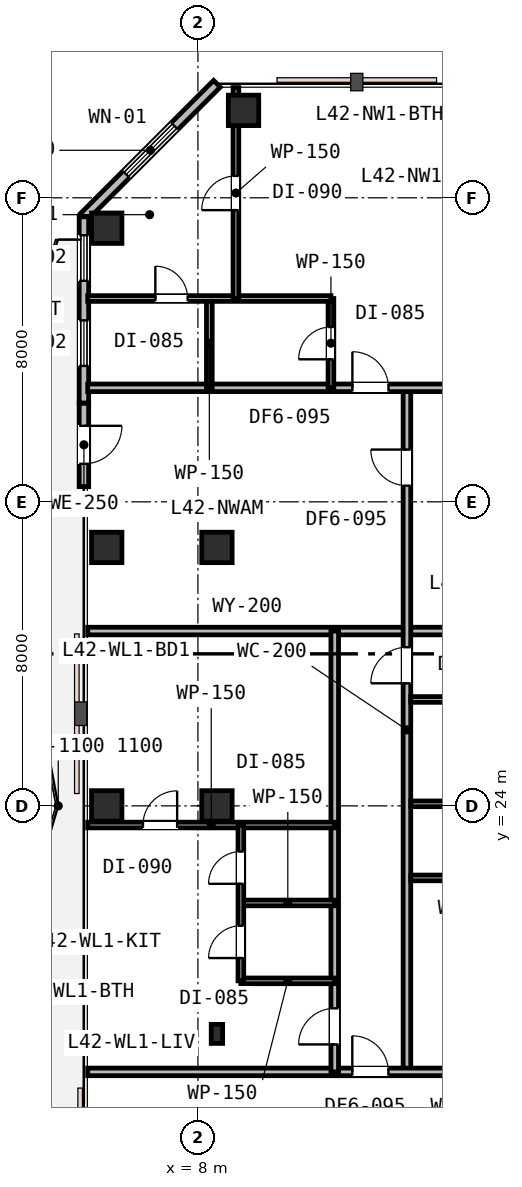
"""IFC4 building model, lengths in metres.
Left out: names, types, materials, properties, quantities, classifications, styles, units other than length and angle.
Written with IfcOpenShell. Run it as: python <this file> out.ifc"""

import sys

from ifc_helpers import new_model, si_unit, direction, frame, frame_2d, origin, origin_2d, place, context, subcontext, project, spatial, rectangle, i_section, extrude, element, fill, save


model = new_model("IFC4")
c1 = context("Model", 3, precision=1e-05, world=origin(), true_north=direction((0.0, 1.0)))
c2 = subcontext(c1, "Body", "Model", "MODEL_VIEW")
j1 = project(units=[si_unit("LENGTHUNIT", "METRE"), si_unit("PLANEANGLEUNIT", "RADIAN")], contexts=[c1])
p1 = place(None, origin())
s1 = spatial("IfcSite", under=j1, at=p1, CompositionType="ELEMENT")
p2 = place(p1, origin())
s2 = spatial("IfcBuilding", under=s1, at=p2, CompositionType="ELEMENT")
p3 = place(p2, frame((0.0, 0.0, 165.0)))
s3 = spatial("IfcBuildingStorey", under=s2, at=p3, CompositionType="ELEMENT", Elevation=165.0)
for number, where, z_axis, x_axis in (
    (1, (8.5, 24.0, 0.0), (0.0, 0.0, 1.0), (1.0, 0.0, 0.0)),
    (2, (5.6, 24.0, 0.0), (0.0, 0.0, 1.0), (1.0, 0.0, 0.0)),
    (3, (5.6, 30.8, 0.0), (0.0, 0.0, 1.0), (1.0, 0.0, 0.0)),
    (4, (5.6, 39.2, 0.0), (0.0, 0.0, 1.0), (1.0, 0.0, 0.0)),
    (5, (8.5, 30.8, 0.0), (0.0, 0.0, 1.0), (1.0, 0.0, 0.0)),
    (6, (9.2, 42.3, 0.0), (0.0, 0.0, 1.0), (1.0, 0.0, 0.0)),
):
    element("IfcColumn", number, at=place(p3, frame(where, z_axis=z_axis, x_axis=x_axis)), inside=s3, PredefinedType="COLUMN", context=c2, shape_type="SweptSolid", body=[
        extrude(rectangle(XDim=0.8, YDim=0.8, at=origin_2d()), origin(), (0.0, 0.0, 1.0), 3.6),
    ])
p4 = place(p3, frame((8.5, 18.0, 0.0), z_axis=(0.0, 0.0, 1.0), x_axis=(1.0, 0.0, 0.0)))
e7 = element("IfcColumn", 7, at=p4, inside=s3, PredefinedType="COLUMN", context=c2, shape_type="SweptSolid", body=[
    extrude(i_section(OverallWidth=0.3, OverallDepth=0.5, WebThickness=0.015, FlangeThickness=0.028, FilletRadius=0.027, at=origin_2d()), origin(), (0.0, 0.0, 1.0), 3.6),
])
p5 = place(p3, frame((8.5, 43.0, 0.0), z_axis=(0.0, 0.0, 1.0), x_axis=(-0.707106781187, -0.707106781187, 0.0)))
e8 = element("IfcWall", 8, at=p5, inside=s3, PredefinedType="STANDARD", context=c2, shape_type="SweptSolid", body=[
    extrude(rectangle(XDim=4.95, YDim=0.25, at=frame_2d((2.475, 0.0))), origin(), (0.0, 0.0, 1.0), 3.33),
])
p6 = place(p5, frame((1.575, 0.0, 0.75)))
e9 = element("IfcOpeningElement", 9, at=p6, cuts=e8, PredefinedType="OPENING", context=c2, shape_type="SweptSolid", body=[
    extrude(rectangle(XDim=1.8, YDim=1.85, at=frame_2d((0.9, 0.925))), frame((0.0, 0.135, 0.0), z_axis=(0.0, -1.0, 0.0), x_axis=(1.0, 0.0, 0.0)), (0.0, 0.0, 1.0), 0.27),
])
p7 = place(p3, frame((5.0, 34.6, 0.0), z_axis=(0.0, 0.0, 1.0), x_axis=(0.0, -1.0, 0.0)))
e10 = element("IfcWall", 10, at=p7, inside=s3, PredefinedType="STANDARD", context=c2, shape_type="SweptSolid", body=[
    extrude(rectangle(XDim=2.2, YDim=0.25, at=frame_2d((1.1, 0.0))), origin(), (0.0, 0.0, 1.0), 3.33),
])
p8 = place(p7, frame((0.6, 0.0, 0.0)))
e11 = element("IfcOpeningElement", 11, at=p8, cuts=e10, PredefinedType="OPENING", context=c2, shape_type="SweptSolid", body=[
    extrude(rectangle(XDim=1.0, YDim=2.15, at=frame_2d((0.5, 1.075))), frame((0.0, 0.135, 0.0), z_axis=(0.0, -1.0, 0.0), x_axis=(1.0, 0.0, 0.0)), (0.0, 0.0, 1.0), 0.27),
])
p9 = place(p3, frame((5.0, 39.5, 0.0), z_axis=(0.0, 0.0, 1.0), x_axis=(0.0, -1.0, 0.0)))
e12 = element("IfcWall", 12, at=p9, inside=s3, PredefinedType="STANDARD", context=c2, shape_type="SweptSolid", body=[
    extrude(rectangle(XDim=4.9, YDim=0.25, at=frame_2d((2.45, 0.0))), origin(), (0.0, 0.0, 1.0), 3.33),
])
p10 = place(p9, frame((0.485, 0.0, 0.85)))
e13 = element("IfcOpeningElement", 13, at=p10, cuts=e12, PredefinedType="OPENING", context=c2, shape_type="SweptSolid", body=[
    extrude(rectangle(XDim=1.2, YDim=1.6, at=frame_2d((0.6, 0.8))), frame((0.0, 0.135, 0.0), z_axis=(0.0, -1.0, 0.0), x_axis=(1.0, 0.0, 0.0)), (0.0, 0.0, 1.0), 0.27),
])
p11 = place(p9, frame((2.725, 0.0, 0.85)))
e14 = element("IfcOpeningElement", 14, at=p11, cuts=e12, PredefinedType="OPENING", context=c2, shape_type="SweptSolid", body=[
    extrude(rectangle(XDim=1.2, YDim=1.6, at=frame_2d((0.6, 0.8))), frame((0.0, 0.135, 0.0), z_axis=(0.0, -1.0, 0.0), x_axis=(1.0, 0.0, 0.0)), (0.0, 0.0, 1.0), 0.27),
])
p12 = place(p3, frame((5.1, 28.6, 0.0), z_axis=(0.0, 0.0, 1.0), x_axis=(1.0, 0.0, 0.0)))
e15 = element("IfcWall", 15, at=p12, inside=s3, PredefinedType="PARTITIONING", context=c2, shape_type="SweptSolid", body=[
    extrude(rectangle(XDim=8.4, YDim=0.2, at=frame_2d((4.2, 0.0))), origin(), (0.0, 0.0, 1.0), 2.93),
])
p13 = place(p3, frame((13.6, 28.6, 0.0), z_axis=(0.0, 0.0, 1.0), x_axis=(1.0, 0.0, 0.0)))
e16 = element("IfcWall", 16, at=p13, inside=s3, PredefinedType="PARTITIONING", context=c2, shape_type="SweptSolid", body=[
    extrude(rectangle(XDim=37.3, YDim=0.2, at=frame_2d((18.65, 0.0))), origin(), (0.0, 0.0, 1.0), 2.93),
])
p14 = place(p13, frame((16.025, 0.0, 0.0)))
e17 = element("IfcOpeningElement", 17, at=p14, cuts=e16, PredefinedType="OPENING", context=c2, shape_type="SweptSolid", body=[
    extrude(rectangle(XDim=0.95, YDim=2.15, at=frame_2d((0.475, 1.075))), frame((0.0, 0.11, 0.0), z_axis=(0.0, -1.0, 0.0), x_axis=(1.0, 0.0, 0.0)), (0.0, 0.0, 1.0), 0.22),
])
p15 = place(p13, frame((25.925, 0.0, 0.0)))
e18 = element("IfcOpeningElement", 18, at=p15, cuts=e16, PredefinedType="OPENING", context=c2, shape_type="SweptSolid", body=[
    extrude(rectangle(XDim=0.95, YDim=2.15, at=frame_2d((0.475, 1.075))), frame((0.0, 0.11, 0.0), z_axis=(0.0, -1.0, 0.0), x_axis=(1.0, 0.0, 0.0)), (0.0, 0.0, 1.0), 0.22),
])
p16 = place(p3, frame((13.5, 17.0, 0.0), z_axis=(0.0, 0.0, 1.0), x_axis=(0.0, 1.0, 0.0)))
e19 = element("IfcWall", 19, at=p16, inside=s3, PredefinedType="PARTITIONING", context=c2, shape_type="SweptSolid", body=[
    extrude(rectangle(XDim=18.0, YDim=0.2, at=frame_2d((9.0, 0.0))), origin(), (0.0, 0.0, 1.0), 2.93),
])
p17 = place(p16, frame((15.425, 0.0, 0.0)))
e20 = element("IfcOpeningElement", 20, at=p17, cuts=e19, PredefinedType="OPENING", context=c2, shape_type="SweptSolid", body=[
    extrude(rectangle(XDim=0.95, YDim=2.15, at=frame_2d((0.475, 1.075))), frame((0.0, 0.11, 0.0), z_axis=(0.0, -1.0, 0.0), x_axis=(1.0, 0.0, 0.0)), (0.0, 0.0, 1.0), 0.22),
])
p18 = place(p16, frame((10.225, 0.0, 0.0)))
e21 = element("IfcOpeningElement", 21, at=p18, cuts=e19, PredefinedType="OPENING", context=c2, shape_type="SweptSolid", body=[
    extrude(rectangle(XDim=0.95, YDim=2.15, at=frame_2d((0.475, 1.075))), frame((0.0, 0.11, 0.0), z_axis=(0.0, -1.0, 0.0), x_axis=(1.0, 0.0, 0.0)), (0.0, 0.0, 1.0), 0.22),
])
p19 = place(p3, frame((5.1, 35.0, 0.0), z_axis=(0.0, 0.0, 1.0), x_axis=(1.0, 0.0, 0.0)))
e22 = element("IfcWall", 22, at=p19, inside=s3, PredefinedType="PARTITIONING", context=c2, shape_type="SweptSolid", body=[
    extrude(rectangle(XDim=10.8, YDim=0.2, at=frame_2d((5.4, 0.0))), origin(), (0.0, 0.0, 1.0), 3.01),
])
p20 = place(p19, frame((6.964, 0.0, 0.0)))
e23 = element("IfcOpeningElement", 23, at=p20, cuts=e22, PredefinedType="OPENING", context=c2, shape_type="SweptSolid", body=[
    extrude(rectangle(XDim=0.95, YDim=2.15, at=frame_2d((0.475, 1.075))), frame((0.0, 0.11, 0.0), z_axis=(0.0, -1.0, 0.0), x_axis=(1.0, 0.0, 0.0)), (0.0, 0.0, 1.0), 0.22),
])
p21 = place(p3, frame((11.5, 35.0, 0.0), z_axis=(0.0, 0.0, 1.0), x_axis=(0.0, 1.0, 0.0)))
e24 = element("IfcWall", 24, at=p21, inside=s3, PredefinedType="PARTITIONING", context=c2, shape_type="SweptSolid", body=[
    extrude(rectangle(XDim=2.35, YDim=0.15, at=frame_2d((1.175, 0.0))), origin(), (0.0, 0.0, 1.0), 3.33),
])
p22 = place(p21, frame((0.75, 0.0, 0.0)))
e25 = element("IfcOpeningElement", 25, at=p22, cuts=e24, PredefinedType="OPENING", context=c2, shape_type="SweptSolid", body=[
    extrude(rectangle(XDim=0.85, YDim=2.15, at=frame_2d((0.425, 1.075))), frame((0.0, 0.085, 0.0), z_axis=(0.0, -1.0, 0.0), x_axis=(1.0, 0.0, 0.0)), (0.0, 0.0, 1.0), 0.17),
])
p23 = place(p3, frame((8.3, 35.0, 0.0), z_axis=(0.0, 0.0, 1.0), x_axis=(0.0, 1.0, 0.0)))
e26 = element("IfcWall", 26, at=p23, inside=s3, PredefinedType="PARTITIONING", context=c2, shape_type="SweptSolid", body=[
    extrude(rectangle(XDim=2.35, YDim=0.15, at=frame_2d((1.175, 0.0))), origin(), (0.0, 0.0, 1.0), 3.33),
])
p24 = place(p3, frame((5.1, 37.35, 0.0), z_axis=(0.0, 0.0, 1.0), x_axis=(1.0, 0.0, 0.0)))
e27 = element("IfcWall", 27, at=p24, inside=s3, PredefinedType="PARTITIONING", context=c2, shape_type="SweptSolid", body=[
    extrude(rectangle(XDim=6.4, YDim=0.15, at=frame_2d((3.2, 0.0))), origin(), (0.0, 0.0, 1.0), 3.01),
])
p25 = place(p24, frame((1.78, 0.0, 0.0)))
e28 = element("IfcOpeningElement", 28, at=p25, cuts=e27, PredefinedType="OPENING", context=c2, shape_type="SweptSolid", body=[
    extrude(rectangle(XDim=0.85, YDim=2.15, at=frame_2d((0.425, 1.075))), frame((0.0, 0.085, 0.0), z_axis=(0.0, -1.0, 0.0), x_axis=(1.0, 0.0, 0.0)), (0.0, 0.0, 1.0), 0.17),
])
p26 = place(p3, frame((9.0, 37.35, 0.0), z_axis=(0.0, 0.0, 1.0), x_axis=(0.0, 1.0, 0.0)))
e29 = element("IfcWall", 29, at=p26, inside=s3, PredefinedType="PARTITIONING", context=c2, shape_type="SweptSolid", body=[
    extrude(rectangle(XDim=5.55, YDim=0.15, at=frame_2d((2.775, 0.0))), origin(), (0.0, 0.0, 1.0), 3.01),
])
p27 = place(p26, frame((2.325, 0.0, 0.0)))
e30 = element("IfcOpeningElement", 30, at=p27, cuts=e29, PredefinedType="OPENING", context=c2, shape_type="SweptSolid", body=[
    extrude(rectangle(XDim=0.9, YDim=2.15, at=frame_2d((0.45, 1.075))), frame((0.0, 0.085, 0.0), z_axis=(0.0, -1.0, 0.0), x_axis=(1.0, 0.0, 0.0)), (0.0, 0.0, 1.0), 0.17),
])
p28 = place(p3, frame((5.1, 17.0, 0.0), z_axis=(0.0, 0.0, 1.0), x_axis=(1.0, 0.0, 0.0)))
e31 = element("IfcWall", 31, at=p28, inside=s3, PredefinedType="PARTITIONING", context=c2, shape_type="SweptSolid", body=[
    extrude(rectangle(XDim=18.8, YDim=0.2, at=frame_2d((9.4, 0.0))), origin(), (0.0, 0.0, 1.0), 2.93),
])
p29 = place(p28, frame((6.962, 0.0, 0.0)))
e32 = element("IfcOpeningElement", 32, at=p29, cuts=e31, PredefinedType="OPENING", context=c2, shape_type="SweptSolid", body=[
    extrude(rectangle(XDim=0.95, YDim=2.15, at=frame_2d((0.475, 1.075))), frame((0.0, 0.11, 0.0), z_axis=(0.0, -1.0, 0.0), x_axis=(1.0, 0.0, 0.0)), (0.0, 0.0, 1.0), 0.22),
])
p30 = place(p3, frame((11.6, 17.0, 0.0), z_axis=(0.0, 0.0, 1.0), x_axis=(0.0, 1.0, 0.0)))
e33 = element("IfcWall", 33, at=p30, inside=s3, PredefinedType="PARTITIONING", context=c2, shape_type="SweptSolid", body=[
    extrude(rectangle(XDim=11.6, YDim=0.2, at=frame_2d((5.8, 0.0))), origin(), (0.0, 0.0, 1.0), 2.93),
])
p31 = place(p30, frame((0.723, 0.0, 0.0)))
e34 = element("IfcOpeningElement", 34, at=p31, cuts=e33, PredefinedType="OPENING", context=c2, shape_type="SweptSolid", body=[
    extrude(rectangle(XDim=0.95, YDim=2.15, at=frame_2d((0.475, 1.075))), frame((0.0, 0.11, 0.0), z_axis=(0.0, -1.0, 0.0), x_axis=(1.0, 0.0, 0.0)), (0.0, 0.0, 1.0), 0.22),
])
for number, where, z_axis, x_axis in (
    (35, (9.13, 19.396, 0.0), (0.0, 0.0, 1.0), (1.0, 0.0, 0.0)),
    (36, (9.13, 21.446, 0.0), (0.0, 0.0, 1.0), (1.0, 0.0, 0.0)),
):
    element("IfcWall", number, at=place(p3, frame(where, z_axis=z_axis, x_axis=x_axis)), inside=s3, PredefinedType="PARTITIONING", context=c2, shape_type="SweptSolid", body=[
        extrude(rectangle(XDim=2.47, YDim=0.15, at=frame_2d((1.235, 0.0))), origin(), (0.0, 0.0, 1.0), 3.33),
    ])
p32 = place(p3, frame((5.1, 23.496, 0.0), z_axis=(0.0, 0.0, 1.0), x_axis=(1.0, 0.0, 0.0)))
e37 = element("IfcWall", 37, at=p32, inside=s3, PredefinedType="PARTITIONING", context=c2, shape_type="SweptSolid", body=[
    extrude(rectangle(XDim=6.5, YDim=0.15, at=frame_2d((3.25, 0.0))), origin(), (0.0, 0.0, 1.0), 2.93),
])
p33 = place(p32, frame((1.453, 0.0, 0.0)))
e38 = element("IfcOpeningElement", 38, at=p33, cuts=e37, PredefinedType="OPENING", context=c2, shape_type="SweptSolid", body=[
    extrude(rectangle(XDim=0.9, YDim=2.15, at=frame_2d((0.45, 1.075))), frame((0.0, 0.085, 0.0), z_axis=(0.0, -1.0, 0.0), x_axis=(1.0, 0.0, 0.0)), (0.0, 0.0, 1.0), 0.17),
])
p34 = place(p3, frame((9.13, 19.396, 0.0), z_axis=(0.0, 0.0, 1.0), x_axis=(0.0, 1.0, 0.0)))
e39 = element("IfcWall", 39, at=p34, inside=s3, PredefinedType="PARTITIONING", context=c2, shape_type="SweptSolid", body=[
    extrude(rectangle(XDim=4.1, YDim=0.15, at=frame_2d((2.05, 0.0))), origin(), (0.0, 0.0, 1.0), 2.93),
])
p35 = place(p34, frame((0.6, 0.0, 0.0)))
e40 = element("IfcOpeningElement", 40, at=p35, cuts=e39, PredefinedType="OPENING", context=c2, shape_type="SweptSolid", body=[
    extrude(rectangle(XDim=0.85, YDim=2.15, at=frame_2d((0.425, 1.075))), frame((0.0, 0.085, 0.0), z_axis=(0.0, -1.0, 0.0), x_axis=(1.0, 0.0, 0.0)), (0.0, 0.0, 1.0), 0.17),
])
p36 = place(p34, frame((2.553, 0.0, 0.0)))
e41 = element("IfcOpeningElement", 41, at=p36, cuts=e39, PredefinedType="OPENING", context=c2, shape_type="SweptSolid", body=[
    extrude(rectangle(XDim=0.85, YDim=2.15, at=frame_2d((0.425, 1.075))), frame((0.0, 0.085, 0.0), z_axis=(0.0, -1.0, 0.0), x_axis=(1.0, 0.0, 0.0)), (0.0, 0.0, 1.0), 0.17),
])
p37 = place(p3, frame((13.6, 22.104, 0.0), z_axis=(0.0, 0.0, 1.0), x_axis=(1.0, 0.0, 0.0)))
e42 = element("IfcWall", 42, at=p37, inside=s3, PredefinedType="PARTITIONING", context=c2, shape_type="SweptSolid", body=[
    extrude(rectangle(XDim=10.3, YDim=0.15, at=frame_2d((5.15, 0.0))), origin(), (0.0, 0.0, 1.0), 2.93),
])
p38 = place(p37, frame((6.325, 0.0, 0.0)))
e43 = element("IfcOpeningElement", 43, at=p38, cuts=e42, PredefinedType="OPENING", context=c2, shape_type="SweptSolid", body=[
    extrude(rectangle(XDim=0.9, YDim=2.15, at=frame_2d((0.45, 1.075))), frame((0.0, 0.085, 0.0), z_axis=(0.0, -1.0, 0.0), x_axis=(1.0, 0.0, 0.0)), (0.0, 0.0, 1.0), 0.17),
])
for number, where, z_axis, x_axis in (
    (44, (13.6, 24.054, 0.0), (0.0, 0.0, 1.0), (1.0, 0.0, 0.0)),
    (45, (13.6, 26.8, 0.0), (0.0, 0.0, 1.0), (1.0, 0.0, 0.0)),
):
    element("IfcWall", number, at=place(p3, frame(where, z_axis=z_axis, x_axis=x_axis)), inside=s3, PredefinedType="PARTITIONING", context=c2, shape_type="SweptSolid", body=[
        extrude(rectangle(XDim=3.25, YDim=0.15, at=frame_2d((1.625, 0.0))), origin(), (0.0, 0.0, 1.0), 2.93),
    ])
p39 = place(p6, origin())
e46 = element("IfcWindow", 46, at=p39, inside=s3, PartitioningType="SINGLE_PANEL", PredefinedType="WINDOW", context=c2, shape_type="SweptSolid", body=[
    extrude(rectangle(XDim=1.8, YDim=1.85, at=frame_2d((0.9, 0.925))), frame((0.0, 0.03, 0.0), z_axis=(0.0, -1.0, 0.0), x_axis=(1.0, 0.0, 0.0)), (0.0, 0.0, 1.0), 0.06),
])
fill(e9, e46)
p40 = place(p8, origin())
e47 = element("IfcDoor", 47, at=p40, inside=s3, OperationType="SINGLE_SWING_LEFT", PredefinedType="DOOR", context=c2, shape_type="SweptSolid", body=[
    extrude(rectangle(XDim=1.0, YDim=2.15, at=frame_2d((0.5, 1.075))), frame((0.0, 0.025, 0.0), z_axis=(0.0, -1.0, 0.0), x_axis=(1.0, 0.0, 0.0)), (0.0, 0.0, 1.0), 0.05),
])
fill(e11, e47)
p41 = place(p10, origin())
e48 = element("IfcWindow", 48, at=p41, inside=s3, PartitioningType="SINGLE_PANEL", PredefinedType="WINDOW", context=c2, shape_type="SweptSolid", body=[
    extrude(rectangle(XDim=1.2, YDim=1.6, at=frame_2d((0.6, 0.8))), frame((0.0, 0.03, 0.0), z_axis=(0.0, -1.0, 0.0), x_axis=(1.0, 0.0, 0.0)), (0.0, 0.0, 1.0), 0.06),
])
fill(e13, e48)
p42 = place(p11, origin())
e49 = element("IfcWindow", 49, at=p42, inside=s3, PartitioningType="SINGLE_PANEL", PredefinedType="WINDOW", context=c2, shape_type="SweptSolid", body=[
    extrude(rectangle(XDim=1.2, YDim=1.6, at=frame_2d((0.6, 0.8))), frame((0.0, 0.03, 0.0), z_axis=(0.0, -1.0, 0.0), x_axis=(1.0, 0.0, 0.0)), (0.0, 0.0, 1.0), 0.06),
])
fill(e14, e49)
p43 = place(p17, origin())
e50 = element("IfcDoor", 50, at=p43, inside=s3, OperationType="SINGLE_SWING_RIGHT", PredefinedType="DOOR", context=c2, shape_type="SweptSolid", body=[
    extrude(rectangle(XDim=0.95, YDim=2.15, at=frame_2d((0.475, 1.075))), frame((0.0, 0.025, 0.0), z_axis=(0.0, -1.0, 0.0), x_axis=(1.0, 0.0, 0.0)), (0.0, 0.0, 1.0), 0.05),
])
fill(e20, e50)
p44 = place(p20, origin())
e51 = element("IfcDoor", 51, at=p44, inside=s3, OperationType="SINGLE_SWING_LEFT", PredefinedType="DOOR", context=c2, shape_type="SweptSolid", body=[
    extrude(rectangle(XDim=0.95, YDim=2.15, at=frame_2d((0.475, 1.075))), frame((0.0, 0.025, 0.0), z_axis=(0.0, -1.0, 0.0), x_axis=(1.0, 0.0, 0.0)), (0.0, 0.0, 1.0), 0.05),
])
fill(e23, e51)
p45 = place(p22, origin())
e52 = element("IfcDoor", 52, at=p45, inside=s3, OperationType="SINGLE_SWING_LEFT", PredefinedType="DOOR", context=c2, shape_type="SweptSolid", body=[
    extrude(rectangle(XDim=0.85, YDim=2.15, at=frame_2d((0.425, 1.075))), frame((0.0, 0.025, 0.0), z_axis=(0.0, -1.0, 0.0), x_axis=(1.0, 0.0, 0.0)), (0.0, 0.0, 1.0), 0.05),
])
fill(e25, e52)
p46 = place(p25, origin())
e53 = element("IfcDoor", 53, at=p46, inside=s3, OperationType="SINGLE_SWING_LEFT", PredefinedType="DOOR", context=c2, shape_type="SweptSolid", body=[
    extrude(rectangle(XDim=0.85, YDim=2.15, at=frame_2d((0.425, 1.075))), frame((0.0, 0.025, 0.0), z_axis=(0.0, -1.0, 0.0), x_axis=(1.0, 0.0, 0.0)), (0.0, 0.0, 1.0), 0.05),
])
fill(e28, e53)
p47 = place(p27, origin())
e54 = element("IfcDoor", 54, at=p47, inside=s3, OperationType="SINGLE_SWING_LEFT", PredefinedType="DOOR", context=c2, shape_type="SweptSolid", body=[
    extrude(rectangle(XDim=0.9, YDim=2.15, at=frame_2d((0.45, 1.075))), frame((0.0, 0.025, 0.0), z_axis=(0.0, -1.0, 0.0), x_axis=(1.0, 0.0, 0.0)), (0.0, 0.0, 1.0), 0.05),
])
fill(e30, e54)
p48 = place(p31, origin())
e55 = element("IfcDoor", 55, at=p48, inside=s3, OperationType="SINGLE_SWING_LEFT", PredefinedType="DOOR", context=c2, shape_type="SweptSolid", body=[
    extrude(rectangle(XDim=0.95, YDim=2.15, at=frame_2d((0.475, 1.075))), frame((0.0, 0.025, 0.0), z_axis=(0.0, -1.0, 0.0), x_axis=(1.0, 0.0, 0.0)), (0.0, 0.0, 1.0), 0.05),
])
fill(e34, e55)
p49 = place(p35, origin())
e56 = element("IfcDoor", 56, at=p49, inside=s3, OperationType="SINGLE_SWING_LEFT", PredefinedType="DOOR", context=c2, shape_type="SweptSolid", body=[
    extrude(rectangle(XDim=0.85, YDim=2.15, at=frame_2d((0.425, 1.075))), frame((0.0, 0.025, 0.0), z_axis=(0.0, -1.0, 0.0), x_axis=(1.0, 0.0, 0.0)), (0.0, 0.0, 1.0), 0.05),
])
fill(e40, e56)
p50 = place(p36, origin())
e57 = element("IfcDoor", 57, at=p50, inside=s3, OperationType="SINGLE_SWING_LEFT", PredefinedType="DOOR", context=c2, shape_type="SweptSolid", body=[
    extrude(rectangle(XDim=0.85, YDim=2.15, at=frame_2d((0.425, 1.075))), frame((0.0, 0.025, 0.0), z_axis=(0.0, -1.0, 0.0), x_axis=(1.0, 0.0, 0.0)), (0.0, 0.0, 1.0), 0.05),
])
fill(e41, e57)
p51 = place(p33, origin())
e58 = element("IfcDoor", 58, at=p51, inside=s3, OperationType="SINGLE_SWING_RIGHT", PredefinedType="DOOR", context=c2, shape_type="SweptSolid", body=[
    extrude(rectangle(XDim=0.9, YDim=2.15, at=frame_2d((0.45, 1.075))), frame((0.0, 0.025, 0.0), z_axis=(0.0, -1.0, 0.0), x_axis=(1.0, 0.0, 0.0)), (0.0, 0.0, 1.0), 0.05),
])
fill(e38, e58)
p52 = place(p18, origin())
e59 = element("IfcDoor", 59, at=p52, inside=s3, OperationType="SINGLE_SWING_LEFT", PredefinedType="DOOR", context=c2, shape_type="SweptSolid", body=[
    extrude(rectangle(XDim=0.95, YDim=2.15, at=frame_2d((0.475, 1.075))), frame((0.0, 0.025, 0.0), z_axis=(0.0, -1.0, 0.0), x_axis=(1.0, 0.0, 0.0)), (0.0, 0.0, 1.0), 0.05),
])
fill(e21, e59)
p53 = place(p29, origin())
e60 = element("IfcDoor", 60, at=p53, inside=s3, OperationType="SINGLE_SWING_LEFT", PredefinedType="DOOR", context=c2, shape_type="SweptSolid", body=[
    extrude(rectangle(XDim=0.95, YDim=2.15, at=frame_2d((0.475, 1.075))), frame((0.0, 0.025, 0.0), z_axis=(0.0, -1.0, 0.0), x_axis=(1.0, 0.0, 0.0)), (0.0, 0.0, 1.0), 0.05),
])
fill(e32, e60)
save(model, sys.argv[1])
